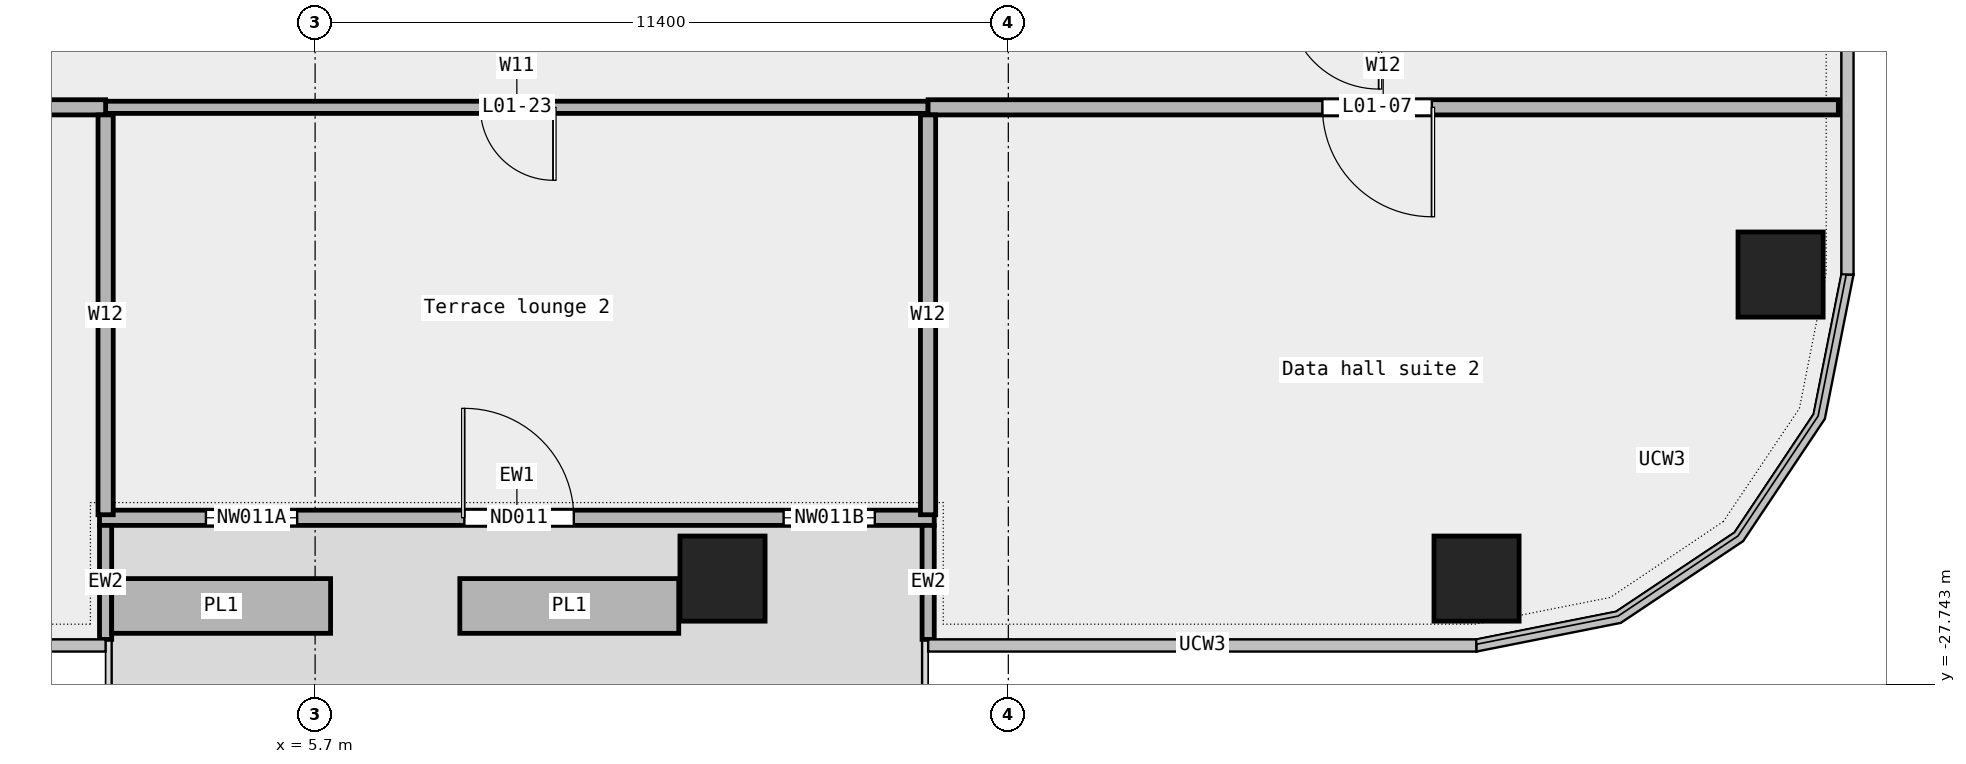
"""IFC4 building model, lengths in metres.
Left out: names, types, materials, properties, quantities, classifications, styles, units other than length and angle.
Written with IfcOpenShell. Run it as: python <this file> out.ifc"""

import sys

from ifc_helpers import new_model, si_unit, direction, frame, frame_2d, origin, origin_2d, place, context, subcontext, project, spatial, rectangle, extrude, element, fill, save


model = new_model("IFC4")
c1 = context("Model", 3, precision=1e-05, world=origin(), true_north=direction((0.0, 1.0)))
c2 = subcontext(c1, "Body", "Model", "MODEL_VIEW")
j1 = project(units=[si_unit("LENGTHUNIT", "METRE"), si_unit("PLANEANGLEUNIT", "RADIAN")], contexts=[c1])
p1 = place(None, origin())
s1 = spatial("IfcSite", under=j1, at=p1, CompositionType="ELEMENT")
p2 = place(p1, origin())
s2 = spatial("IfcBuilding", under=s1, at=p2, CompositionType="ELEMENT")
p3 = place(p2, frame((0.0, 0.0, 9.0)))
s3 = spatial("IfcBuildingStorey", under=s2, at=p3, CompositionType="ELEMENT", Elevation=9.0)
for number, where, z_axis, x_axis in (
    (1, (12.4, -26.0, 0.0), (0.0, 0.0, 1.0), (1.0, 0.0, 0.0)),
    (2, (24.8, -26.0, 0.0), (0.0, 0.0, 1.0), (1.0, 0.0, 0.0)),
    (3, (29.8, -21.0, 0.0), (0.0, 0.0, 1.0), (1.0, 0.0, 0.0)),
):
    element("IfcColumn", number, at=place(p3, frame(where, z_axis=z_axis, x_axis=x_axis)), inside=s3, PredefinedType="COLUMN", context=c2, shape_type="SweptSolid", body=[
        extrude(rectangle(XDim=1.4, YDim=1.4, at=origin_2d()), origin(), (0.0, 0.0, 1.0), 5.0),
    ])
p4 = place(p3, frame((2.155, -25.0, 0.0), z_axis=(0.0, 0.0, 1.0), x_axis=(1.0, 0.0, 0.0)))
e4 = element("IfcWall", 4, at=p4, inside=s3, PredefinedType="STANDARD", context=c2, shape_type="SweptSolid", body=[
    extrude(rectangle(XDim=13.727, YDim=0.25, at=frame_2d((6.864, 0.0))), origin(), (0.0, 0.0, 1.0), 5.0),
])
p5 = place(p4, frame((1.75, 0.0, 0.45)))
e5 = element("IfcOpeningElement", 5, at=p5, cuts=e4, PredefinedType="OPENING", context=c2, shape_type="SweptSolid", body=[
    extrude(rectangle(XDim=1.5, YDim=3.0, at=frame_2d((0.75, 1.5))), frame((0.0, 0.137, 0.0), z_axis=(0.0, -1.0, 0.0), x_axis=(1.0, 0.0, 0.0)), (0.0, 0.0, 1.0), 0.274),
])
p6 = place(p4, frame((6.0, 0.0, 0.0)))
e6 = element("IfcOpeningElement", 6, at=p6, cuts=e4, PredefinedType="OPENING", context=c2, shape_type="SweptSolid", body=[
    extrude(rectangle(XDim=1.8, YDim=2.4, at=frame_2d((0.9, 1.2))), frame((0.0, 0.137, 0.0), z_axis=(0.0, -1.0, 0.0), x_axis=(1.0, 0.0, 0.0)), (0.0, 0.0, 1.0), 0.274),
])
p7 = place(p4, frame((11.25, 0.0, 0.45)))
e7 = element("IfcOpeningElement", 7, at=p7, cuts=e4, PredefinedType="OPENING", context=c2, shape_type="SweptSolid", body=[
    extrude(rectangle(XDim=1.5, YDim=3.0, at=frame_2d((0.75, 1.5))), frame((0.0, 0.137, 0.0), z_axis=(0.0, -1.0, 0.0), x_axis=(1.0, 0.0, 0.0)), (0.0, 0.0, 1.0), 0.274),
])
for number, where, z_axis, x_axis in (
    (8, (2.255, -27.0, 0.0), (0.0, 0.0, 1.0), (0.0, 1.0, 0.0)),
    (9, (15.782, -27.0, 0.0), (0.0, 0.0, 1.0), (0.0, 1.0, 0.0)),
):
    element("IfcWall", number, at=place(p3, frame(where, z_axis=z_axis, x_axis=x_axis)), inside=s3, PredefinedType="STANDARD", context=c2, shape_type="SweptSolid", body=[
        extrude(rectangle(XDim=1.875, YDim=0.2, at=frame_2d((0.938, 0.0))), origin(), (0.0, 0.0, 1.0), 5.0),
    ])
for number, where, z_axis, x_axis in (
    (10, (2.354, -26.45, 0.0), (0.0, 0.0, 1.0), (1.0, 0.0, 0.0)),
    (11, (8.08, -26.45, 0.0), (0.0, 0.0, 1.0), (1.0, 0.0, 0.0)),
):
    element("IfcWall", number, at=place(p3, frame(where, z_axis=z_axis, x_axis=x_axis)), inside=s3, PredefinedType="STANDARD", context=c2, shape_type="SweptSolid", body=[
        extrude(rectangle(XDim=3.6, YDim=0.9, at=frame_2d((1.8, 0.0))), origin(), (0.0, 0.0, 1.0), 0.7),
    ])
p8 = place(p3, frame((2.255, -18.25, 0.0), z_axis=(0.0, 0.0, 1.0), x_axis=(1.0, 0.0, 0.0)))
e12 = element("IfcWall", 12, at=p8, inside=s3, PredefinedType="PARTITIONING", context=c2, shape_type="SweptSolid", body=[
    extrude(rectangle(XDim=13.525, YDim=0.2, at=frame_2d((6.763, 0.0))), origin(), (0.0, 0.0, 1.0), 5.0),
])
p9 = place(p8, frame((6.163, 0.0, 0.0)))
e13 = element("IfcOpeningElement", 13, at=p9, cuts=e12, PredefinedType="OPENING", context=c2, shape_type="SweptSolid", body=[
    extrude(rectangle(XDim=1.2, YDim=2.1, at=frame_2d((0.6, 1.05))), frame((0.0, 0.112, 0.0), z_axis=(0.0, -1.0, 0.0), x_axis=(1.0, 0.0, 0.0)), (0.0, 0.0, 1.0), 0.224),
])
p10 = place(p3, frame((-30.75, -18.25, 0.0), z_axis=(0.0, 0.0, 1.0), x_axis=(1.0, 0.0, 0.0)))
e14 = element("IfcWall", 14, at=p10, inside=s3, PredefinedType="PARTITIONING", context=c2, shape_type="SweptSolid", body=[
    extrude(rectangle(XDim=33.005, YDim=0.25, at=frame_2d((16.502, 0.0))), origin(), (0.0, 0.0, 1.0), 5.0),
])
p11 = place(p10, frame((9.482, 0.0, 0.0)))
e15 = element("IfcOpeningElement", 15, at=p11, cuts=e14, PredefinedType="OPENING", context=c2, shape_type="SweptSolid", body=[
    extrude(rectangle(XDim=1.8, YDim=2.1, at=frame_2d((0.9, 1.05))), frame((0.0, 0.137, 0.0), z_axis=(0.0, -1.0, 0.0), x_axis=(1.0, 0.0, 0.0)), (0.0, 0.0, 1.0), 0.274),
])
p12 = place(p10, frame((25.885, 0.0, 0.0)))
e16 = element("IfcOpeningElement", 16, at=p12, cuts=e14, PredefinedType="OPENING", context=c2, shape_type="SweptSolid", body=[
    extrude(rectangle(XDim=1.8, YDim=2.1, at=frame_2d((0.9, 1.05))), frame((0.0, 0.137, 0.0), z_axis=(0.0, -1.0, 0.0), x_axis=(1.0, 0.0, 0.0)), (0.0, 0.0, 1.0), 0.274),
])
p13 = place(p3, frame((15.78, -18.25, 0.0), z_axis=(0.0, 0.0, 1.0), x_axis=(1.0, 0.0, 0.0)))
e17 = element("IfcWall", 17, at=p13, inside=s3, PredefinedType="PARTITIONING", context=c2, shape_type="SweptSolid", body=[
    extrude(rectangle(XDim=14.97, YDim=0.25, at=frame_2d((7.485, 0.0))), origin(), (0.0, 0.0, 1.0), 5.0),
])
p14 = place(p13, frame((6.485, 0.0, 0.0)))
e18 = element("IfcOpeningElement", 18, at=p14, cuts=e17, PredefinedType="OPENING", context=c2, shape_type="SweptSolid", body=[
    extrude(rectangle(XDim=1.8, YDim=2.1, at=frame_2d((0.9, 1.05))), frame((0.0, 0.137, 0.0), z_axis=(0.0, -1.0, 0.0), x_axis=(1.0, 0.0, 0.0)), (0.0, 0.0, 1.0), 0.274),
])
for number, where, z_axis, x_axis in (
    (19, (2.255, -24.95, 0.0), (0.0, 0.0, 1.0), (0.0, 1.0, 0.0)),
    (20, (15.78, -24.95, 0.0), (0.0, 0.0, 1.0), (0.0, 1.0, 0.0)),
):
    element("IfcWall", number, at=place(p3, frame(where, z_axis=z_axis, x_axis=x_axis)), inside=s3, PredefinedType="PARTITIONING", context=c2, shape_type="SweptSolid", body=[
        extrude(rectangle(XDim=6.575, YDim=0.25, at=frame_2d((3.288, 0.0))), origin(), (0.0, 0.0, 1.0), 5.0),
    ])
p15 = place(p5, origin())
e21 = element("IfcWindow", 21, at=p15, inside=s3, PartitioningType="SINGLE_PANEL", PredefinedType="WINDOW", context=c2, shape_type="SweptSolid", body=[
    extrude(rectangle(XDim=1.5, YDim=3.0, at=frame_2d((0.75, 1.5))), frame((0.0, 0.03, 0.0), z_axis=(0.0, -1.0, 0.0), x_axis=(1.0, 0.0, 0.0)), (0.0, 0.0, 1.0), 0.06),
])
fill(e5, e21)
p16 = place(p6, origin())
e22 = element("IfcDoor", 22, at=p16, inside=s3, OperationType="DOUBLE_DOOR_SINGLE_SWING", PredefinedType="DOOR", context=c2, shape_type="SweptSolid", body=[
    extrude(rectangle(XDim=1.8, YDim=2.4, at=frame_2d((0.9, 1.2))), frame((0.0, 0.025, 0.0), z_axis=(0.0, -1.0, 0.0), x_axis=(1.0, 0.0, 0.0)), (0.0, 0.0, 1.0), 0.05),
])
fill(e6, e22)
p17 = place(p7, origin())
e23 = element("IfcWindow", 23, at=p17, inside=s3, PartitioningType="SINGLE_PANEL", PredefinedType="WINDOW", context=c2, shape_type="SweptSolid", body=[
    extrude(rectangle(XDim=1.5, YDim=3.0, at=frame_2d((0.75, 1.5))), frame((0.0, 0.03, 0.0), z_axis=(0.0, -1.0, 0.0), x_axis=(1.0, 0.0, 0.0)), (0.0, 0.0, 1.0), 0.06),
])
fill(e7, e23)
p18 = place(p14, origin())
e24 = element("IfcDoor", 24, at=p18, inside=s3, OperationType="DOUBLE_DOOR_SINGLE_SWING", PredefinedType="DOOR", context=c2, shape_type="SweptSolid", body=[
    extrude(rectangle(XDim=1.8, YDim=2.1, at=frame_2d((0.9, 1.05))), frame((0.0, 0.025, 0.0), z_axis=(0.0, -1.0, 0.0), x_axis=(1.0, 0.0, 0.0)), (0.0, 0.0, 1.0), 0.05),
])
fill(e18, e24)
p19 = place(p9, origin())
e25 = element("IfcDoor", 25, at=p19, inside=s3, OperationType="SINGLE_SWING_LEFT", PredefinedType="DOOR", context=c2, shape_type="SweptSolid", body=[
    extrude(rectangle(XDim=1.2, YDim=2.1, at=frame_2d((0.6, 1.05))), frame((0.0, 0.025, 0.0), z_axis=(0.0, -1.0, 0.0), x_axis=(1.0, 0.0, 0.0)), (0.0, 0.0, 1.0), 0.05),
])
fill(e13, e25)
save(model, sys.argv[1])
